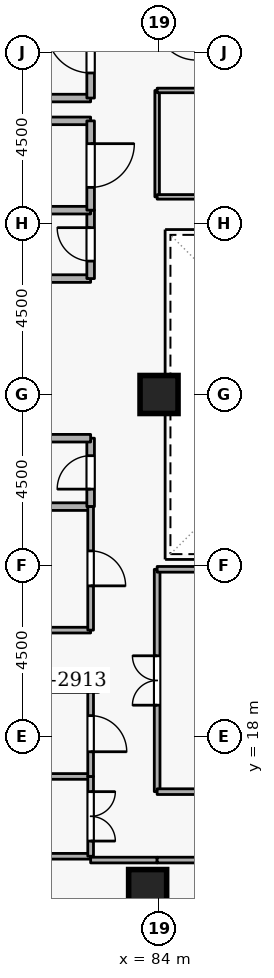
"""IFC4 building model, lengths in metres.
Left out: names, types, materials, properties, quantities, classifications, styles, units other than length and angle.
Written with IfcOpenShell. Run it as: python <this file> out.ifc"""

import sys

from ifc_helpers import new_model, si_unit, direction, frame, frame_2d, origin, origin_2d, place, context, subcontext, project, spatial, rectangle, extrude, element, fill, save


model = new_model("IFC4")
c1 = context("Model", 3, precision=1e-05, world=origin(), true_north=direction((0.0, 1.0)))
c2 = subcontext(c1, "Body", "Model", "MODEL_VIEW")
j1 = project(units=[si_unit("LENGTHUNIT", "METRE"), si_unit("PLANEANGLEUNIT", "RADIAN")], contexts=[c1])
p1 = place(None, origin())
s1 = spatial("IfcSite", under=j1, at=p1, CompositionType="ELEMENT")
p2 = place(p1, origin())
s2 = spatial("IfcBuilding", under=s1, at=p2, CompositionType="ELEMENT")
p3 = place(p2, frame((0.0, 0.0, 240.3)))
s3 = spatial("IfcBuildingStorey", under=s2, at=p3, CompositionType="ELEMENT", Elevation=240.3)
p4 = place(p3, frame((76.6, 19.45, 0.0), z_axis=(0.0, 0.0, 1.0), x_axis=(1.0, 0.0, 0.0)))
e1 = element("IfcWall", 1, at=p4, inside=s3, PredefinedType="SHEAR", context=c2, shape_type="SweptSolid", body=[
    extrude(rectangle(XDim=5.8, YDim=0.5, at=frame_2d((2.9, 0.0))), origin(), (0.0, 0.0, 1.0), 3.6),
])
for number, where, z_axis, x_axis in (
    (2, (83.7, 14.0, 0.0), (0.0, 0.0, 1.0), (1.0, 0.0, 0.0)),
    (3, (84.0, 27.0, 0.0), (0.0, 0.0, 1.0), (1.0, 0.0, 0.0)),
):
    element("IfcColumn", number, at=place(p3, frame(where, z_axis=z_axis, x_axis=x_axis)), inside=s3, PredefinedType="COLUMN", context=c2, shape_type="SweptSolid", body=[
        extrude(rectangle(XDim=1.0, YDim=1.0, at=origin_2d()), origin(), (0.0, 0.0, 1.0), 3.6),
    ])
p5 = place(p3, frame((79.9, 34.8, 0.0), z_axis=(0.0, 0.0, 1.0), x_axis=(1.0, 0.0, 0.0)))
e4 = element("IfcWall", 4, at=p5, inside=s3, PredefinedType="STANDARD", context=c2, shape_type="SweptSolid", body=[
    extrude(rectangle(XDim=2.3, YDim=0.2, at=frame_2d((1.15, 0.0))), origin(), (0.0, 0.0, 1.0), 2.545),
])
p6 = place(p3, frame((82.2, 34.8, 0.0), z_axis=(0.0, 0.0, 1.0), x_axis=(0.0, 1.0, 0.0)))
e5 = element("IfcWall", 5, at=p6, inside=s3, PredefinedType="STANDARD", context=c2, shape_type="SweptSolid", body=[
    extrude(rectangle(XDim=2.5, YDim=0.2, at=frame_2d((1.25, 0.0))), origin(), (0.0, 0.0, 1.0), 3.34),
])
p7 = place(p6, frame((0.66, 0.0, 0.0)))
e6 = element("IfcOpeningElement", 6, at=p7, cuts=e5, PredefinedType="OPENING", context=c2, shape_type="SweptSolid", body=[
    extrude(rectangle(XDim=1.15, YDim=2.1, at=frame_2d((0.575, 1.05))), frame((0.0, 0.11, 0.0), z_axis=(0.0, -1.0, 0.0), x_axis=(1.0, 0.0, 0.0)), (0.0, 0.0, 1.0), 0.22),
])
p8 = place(p3, frame((80.15, 24.05, 0.0), z_axis=(0.0, 0.0, 1.0), x_axis=(1.0, 0.0, 0.0)))
e7 = element("IfcWall", 7, at=p8, inside=s3, PredefinedType="STANDARD", context=c2, shape_type="SweptSolid", body=[
    extrude(rectangle(XDim=2.05, YDim=0.2, at=frame_2d((1.025, 0.0))), origin(), (0.0, 0.0, 1.0), 3.34),
])
p9 = place(p3, frame((82.2, 24.05, 0.0), z_axis=(0.0, 0.0, 1.0), x_axis=(0.0, 1.0, 0.0)))
e8 = element("IfcWall", 8, at=p9, inside=s3, PredefinedType="STANDARD", context=c2, shape_type="SweptSolid", body=[
    extrude(rectangle(XDim=1.8, YDim=0.2, at=frame_2d((0.9, 0.0))), origin(), (0.0, 0.0, 1.0), 3.34),
])
p10 = place(p9, frame((0.46, 0.0, 0.0)))
e9 = element("IfcOpeningElement", 9, at=p10, cuts=e8, PredefinedType="OPENING", context=c2, shape_type="SweptSolid", body=[
    extrude(rectangle(XDim=0.88, YDim=2.04, at=frame_2d((0.44, 1.02))), frame((0.0, 0.11, 0.0), z_axis=(0.0, -1.0, 0.0), x_axis=(1.0, 0.0, 0.0)), (0.0, 0.0, 1.0), 0.22),
])
for number, where, z_axis, x_axis in (
    (10, (82.2, 25.85, 0.0), (0.0, 0.0, 1.0), (-1.0, 0.0, 0.0)),
    (11, (80.15, 30.05, 0.0), (0.0, 0.0, 1.0), (1.0, 0.0, 0.0)),
):
    element("IfcWall", number, at=place(p3, frame(where, z_axis=z_axis, x_axis=x_axis)), inside=s3, PredefinedType="STANDARD", context=c2, shape_type="SweptSolid", body=[
        extrude(rectangle(XDim=2.05, YDim=0.2, at=frame_2d((1.025, 0.0))), origin(), (0.0, 0.0, 1.0), 3.34),
    ])
p11 = place(p3, frame((82.2, 30.05, 0.0), z_axis=(0.0, 0.0, 1.0), x_axis=(0.0, 1.0, 0.0)))
e12 = element("IfcWall", 12, at=p11, inside=s3, PredefinedType="STANDARD", context=c2, shape_type="SweptSolid", body=[
    extrude(rectangle(XDim=1.8, YDim=0.2, at=frame_2d((0.9, 0.0))), origin(), (0.0, 0.0, 1.0), 3.34),
])
p12 = place(p11, frame((0.46, 0.0, 0.0)))
e13 = element("IfcOpeningElement", 13, at=p12, cuts=e12, PredefinedType="OPENING", context=c2, shape_type="SweptSolid", body=[
    extrude(rectangle(XDim=0.88, YDim=2.04, at=frame_2d((0.44, 1.02))), frame((0.0, 0.11, 0.0), z_axis=(0.0, -1.0, 0.0), x_axis=(1.0, 0.0, 0.0)), (0.0, 0.0, 1.0), 0.22),
])
p13 = place(p3, frame((82.2, 31.85, 0.0), z_axis=(0.0, 0.0, 1.0), x_axis=(-1.0, 0.0, 0.0)))
e14 = element("IfcWall", 14, at=p13, inside=s3, PredefinedType="STANDARD", context=c2, shape_type="SweptSolid", body=[
    extrude(rectangle(XDim=2.05, YDim=0.2, at=frame_2d((1.025, 0.0))), origin(), (0.0, 0.0, 1.0), 3.34),
])
p14 = place(p3, frame((80.15, 34.2, 0.0), z_axis=(0.0, 0.0, 1.0), x_axis=(1.0, 0.0, 0.0)))
e15 = element("IfcWall", 15, at=p14, inside=s3, PredefinedType="STANDARD", context=c2, shape_type="SweptSolid", body=[
    extrude(rectangle(XDim=2.05, YDim=0.2, at=frame_2d((1.025, 0.0))), origin(), (0.0, 0.0, 1.0), 2.545),
])
p15 = place(p3, frame((82.2, 34.2, 0.0), z_axis=(0.0, 0.0, 1.0), x_axis=(0.0, -1.0, 0.0)))
e16 = element("IfcWall", 16, at=p15, inside=s3, PredefinedType="STANDARD", context=c2, shape_type="SweptSolid", body=[
    extrude(rectangle(XDim=2.35, YDim=0.2, at=frame_2d((1.175, 0.0))), origin(), (0.0, 0.0, 1.0), 3.34),
])
p16 = place(p15, frame((0.6, 0.0, 0.0)))
e17 = element("IfcOpeningElement", 17, at=p16, cuts=e16, PredefinedType="OPENING", context=c2, shape_type="SweptSolid", body=[
    extrude(rectangle(XDim=1.15, YDim=2.1, at=frame_2d((0.575, 1.05))), frame((0.0, 0.11, 0.0), z_axis=(0.0, -1.0, 0.0), x_axis=(1.0, 0.0, 0.0)), (0.0, 0.0, 1.0), 0.22),
])
p17 = place(p3, frame((82.2, 20.8, 0.0), z_axis=(0.0, 0.0, 1.0), x_axis=(-1.0, 0.0, 0.0)))
e18 = element("IfcWall", 18, at=p17, inside=s3, PredefinedType="PARTITIONING", context=c2, shape_type="SweptSolid", body=[
    extrude(rectangle(XDim=2.05, YDim=0.15, at=frame_2d((1.025, 0.0))), origin(), (0.0, 0.0, 1.0), 3.34),
])
p18 = place(p3, frame((82.2, 24.05, 0.0), z_axis=(0.0, 0.0, 1.0), x_axis=(0.0, -1.0, 0.0)))
e19 = element("IfcWall", 19, at=p18, inside=s3, PredefinedType="PARTITIONING", context=c2, shape_type="SweptSolid", body=[
    extrude(rectangle(XDim=3.25, YDim=0.15, at=frame_2d((1.625, 0.0))), origin(), (0.0, 0.0, 1.0), 3.34),
])
p19 = place(p18, frame((1.165, 0.0, 0.0)))
e20 = element("IfcOpeningElement", 20, at=p19, cuts=e19, PredefinedType="OPENING", context=c2, shape_type="SweptSolid", body=[
    extrude(rectangle(XDim=0.92, YDim=2.08, at=frame_2d((0.46, 1.04))), frame((0.0, 0.085, 0.0), z_axis=(0.0, -1.0, 0.0), x_axis=(1.0, 0.0, 0.0)), (0.0, 0.0, 1.0), 0.17),
])
for number, where, z_axis, x_axis in (
    (21, (82.2, 14.85, 0.0), (0.0, 0.0, 1.0), (-1.0, 0.0, 0.0)),
    (22, (70.78, 16.95, 0.0), (0.0, 0.0, 1.0), (1.0, 0.0, 0.0)),
):
    element("IfcWall", number, at=place(p3, frame(where, z_axis=z_axis, x_axis=x_axis)), inside=s3, PredefinedType="PARTITIONING", context=c2, shape_type="SweptSolid", body=[
        extrude(rectangle(XDim=11.42, YDim=0.15, at=frame_2d((5.71, 0.0))), origin(), (0.0, 0.0, 1.0), 3.34),
    ])
p20 = place(p3, frame((82.2, 16.95, 0.0), z_axis=(0.0, 0.0, 1.0), x_axis=(0.0, -1.0, 0.0)))
e23 = element("IfcWall", 23, at=p20, inside=s3, PredefinedType="PARTITIONING", context=c2, shape_type="SweptSolid", body=[
    extrude(rectangle(XDim=2.1, YDim=0.15, at=frame_2d((1.05, 0.0))), origin(), (0.0, 0.0, 1.0), 3.34),
])
p21 = place(p20, frame((0.4, 0.0, 0.0)))
e24 = element("IfcOpeningElement", 24, at=p21, cuts=e23, PredefinedType="OPENING", context=c2, shape_type="SweptSolid", body=[
    extrude(rectangle(XDim=1.3, YDim=2.12, at=frame_2d((0.65, 1.06))), frame((0.0, 0.085, 0.0), z_axis=(0.0, -1.0, 0.0), x_axis=(1.0, 0.0, 0.0)), (0.0, 0.0, 1.0), 0.17),
])
p22 = place(p3, frame((82.2, 19.2, 0.0), z_axis=(0.0, 0.0, 1.0), x_axis=(0.0, -1.0, 0.0)))
e25 = element("IfcWall", 25, at=p22, inside=s3, PredefinedType="PARTITIONING", context=c2, shape_type="SweptSolid", body=[
    extrude(rectangle(XDim=2.25, YDim=0.15, at=frame_2d((1.125, 0.0))), origin(), (0.0, 0.0, 1.0), 3.34),
])
p23 = place(p22, frame((0.65, 0.0, 0.0)))
e26 = element("IfcOpeningElement", 26, at=p23, cuts=e25, PredefinedType="OPENING", context=c2, shape_type="SweptSolid", body=[
    extrude(rectangle(XDim=0.95, YDim=2.1, at=frame_2d((0.475, 1.05))), frame((0.0, 0.085, 0.0), z_axis=(0.0, -1.0, 0.0), x_axis=(1.0, 0.0, 0.0)), (0.0, 0.0, 1.0), 0.17),
])
p24 = place(p3, frame((82.2, 14.75, 0.0), z_axis=(0.0, 0.0, 1.0), x_axis=(1.0, 0.0, 0.0)))
e27 = element("IfcWall", 27, at=p24, inside=s3, PredefinedType="PARTITIONING", context=c2, shape_type="SweptSolid", body=[
    extrude(rectangle(XDim=1.75, YDim=0.15, at=frame_2d((0.875, 0.0))), origin(), (0.0, 0.0, 1.0), 3.34),
])
p25 = place(p3, frame((83.95, 14.75, 0.0), z_axis=(0.0, 0.0, 1.0), x_axis=(1.0, 0.0, 0.0)))
e28 = element("IfcWall", 28, at=p25, inside=s3, PredefinedType="PARTITIONING", context=c2, shape_type="SweptSolid", body=[
    extrude(rectangle(XDim=3.35, YDim=0.15, at=frame_2d((1.675, 0.0))), origin(), (0.0, 0.0, 1.0), 3.34),
])
p26 = place(p25, frame((1.025, 0.0, 0.0)))
e29 = element("IfcOpeningElement", 29, at=p26, cuts=e28, PredefinedType="OPENING", context=c2, shape_type="SweptSolid", body=[
    extrude(rectangle(XDim=1.3, YDim=2.12, at=frame_2d((0.65, 1.06))), frame((0.0, 0.085, 0.0), z_axis=(0.0, -1.0, 0.0), x_axis=(1.0, 0.0, 0.0)), (0.0, 0.0, 1.0), 0.17),
])
p27 = place(p3, frame((83.95, 16.55, 0.0), z_axis=(0.0, 0.0, 1.0), x_axis=(0.0, 1.0, 0.0)))
e30 = element("IfcWall", 30, at=p27, inside=s3, PredefinedType="PARTITIONING", context=c2, shape_type="SweptSolid", body=[
    extrude(rectangle(XDim=5.85, YDim=0.15, at=frame_2d((2.925, 0.0))), origin(), (0.0, 0.0, 1.0), 3.34),
])
p28 = place(p27, frame((2.275, 0.0, 0.0)))
e31 = element("IfcOpeningElement", 31, at=p28, cuts=e30, PredefinedType="OPENING", context=c2, shape_type="SweptSolid", body=[
    extrude(rectangle(XDim=1.3, YDim=2.12, at=frame_2d((0.65, 1.06))), frame((0.0, 0.085, 0.0), z_axis=(0.0, -1.0, 0.0), x_axis=(1.0, 0.0, 0.0)), (0.0, 0.0, 1.0), 0.17),
])
for number, where, z_axis, x_axis in (
    (32, (83.95, 22.4, 0.0), (0.0, 0.0, 1.0), (1.0, 0.0, 0.0)),
    (33, (87.3, 16.55, 0.0), (0.0, 0.0, 1.0), (-1.0, 0.0, 0.0)),
):
    element("IfcWall", number, at=place(p3, frame(where, z_axis=z_axis, x_axis=x_axis)), inside=s3, PredefinedType="PARTITIONING", context=c2, shape_type="SweptSolid", body=[
        extrude(rectangle(XDim=3.35, YDim=0.15, at=frame_2d((1.675, 0.0))), origin(), (0.0, 0.0, 1.0), 3.34),
    ])
p29 = place(p3, frame((83.95, 32.2, 0.0), z_axis=(0.0, 0.0, 1.0), x_axis=(0.0, 1.0, 0.0)))
e34 = element("IfcWall", 34, at=p29, inside=s3, PredefinedType="PARTITIONING", context=c2, shape_type="SweptSolid", body=[
    extrude(rectangle(XDim=2.8, YDim=0.12, at=frame_2d((1.4, 0.0))), origin(), (0.0, 0.0, 1.0), 3.34),
])
p30 = place(p3, frame((83.95, 35.0, 0.0), z_axis=(0.0, 0.0, 1.0), x_axis=(1.0, 0.0, 0.0)))
e35 = element("IfcWall", 35, at=p30, inside=s3, PredefinedType="PARTITIONING", context=c2, shape_type="SweptSolid", body=[
    extrude(rectangle(XDim=4.55, YDim=0.12, at=frame_2d((2.275, 0.0))), origin(), (0.0, 0.0, 1.0), 3.34),
])
p31 = place(p30, frame((1.8, 0.0, 0.0)))
e36 = element("IfcOpeningElement", 36, at=p31, cuts=e35, PredefinedType="OPENING", context=c2, shape_type="SweptSolid", body=[
    extrude(rectangle(XDim=0.95, YDim=2.1, at=frame_2d((0.475, 1.05))), frame((0.0, 0.07, 0.0), z_axis=(0.0, -1.0, 0.0), x_axis=(1.0, 0.0, 0.0)), (0.0, 0.0, 1.0), 0.14),
])
p32 = place(p3, frame((88.5, 32.2, 0.0), z_axis=(0.0, 0.0, 1.0), x_axis=(-1.0, 0.0, 0.0)))
e37 = element("IfcWall", 37, at=p32, inside=s3, PredefinedType="PARTITIONING", context=c2, shape_type="SweptSolid", body=[
    extrude(rectangle(XDim=4.55, YDim=0.12, at=frame_2d((2.275, 0.0))), origin(), (0.0, 0.0, 1.0), 3.34),
])
p33 = place(p7, origin())
e38 = element("IfcDoor", 38, at=p33, inside=s3, OperationType="SINGLE_SWING_RIGHT", PredefinedType="DOOR", context=c2, shape_type="SweptSolid", body=[
    extrude(rectangle(XDim=1.15, YDim=2.1, at=frame_2d((0.575, 1.05))), frame((0.0, 0.025, 0.0), z_axis=(0.0, -1.0, 0.0), x_axis=(1.0, 0.0, 0.0)), (0.0, 0.0, 1.0), 0.05),
])
fill(e6, e38)
p34 = place(p10, origin())
e39 = element("IfcDoor", 39, at=p34, inside=s3, OperationType="SINGLE_SWING_LEFT", PredefinedType="DOOR", context=c2, shape_type="SweptSolid", body=[
    extrude(rectangle(XDim=0.88, YDim=2.04, at=frame_2d((0.44, 1.02))), frame((0.0, 0.025, 0.0), z_axis=(0.0, -1.0, 0.0), x_axis=(1.0, 0.0, 0.0)), (0.0, 0.0, 1.0), 0.05),
])
fill(e9, e39)
p35 = place(p12, origin())
e40 = element("IfcDoor", 40, at=p35, inside=s3, OperationType="SINGLE_SWING_RIGHT", PredefinedType="DOOR", context=c2, shape_type="SweptSolid", body=[
    extrude(rectangle(XDim=0.88, YDim=2.04, at=frame_2d((0.44, 1.02))), frame((0.0, 0.025, 0.0), z_axis=(0.0, -1.0, 0.0), x_axis=(1.0, 0.0, 0.0)), (0.0, 0.0, 1.0), 0.05),
])
fill(e13, e40)
p36 = place(p19, origin())
e41 = element("IfcDoor", 41, at=p36, inside=s3, OperationType="SINGLE_SWING_RIGHT", PredefinedType="DOOR", context=c2, shape_type="SweptSolid", body=[
    extrude(rectangle(XDim=0.92, YDim=2.08, at=frame_2d((0.46, 1.04))), frame((0.0, 0.025, 0.0), z_axis=(0.0, -1.0, 0.0), x_axis=(1.0, 0.0, 0.0)), (0.0, 0.0, 1.0), 0.05),
])
fill(e20, e41)
p37 = place(p16, origin())
e42 = element("IfcDoor", 42, at=p37, inside=s3, OperationType="SINGLE_SWING_LEFT", PredefinedType="DOOR", context=c2, shape_type="SweptSolid", body=[
    extrude(rectangle(XDim=1.15, YDim=2.1, at=frame_2d((0.575, 1.05))), frame((0.0, 0.025, 0.0), z_axis=(0.0, -1.0, 0.0), x_axis=(1.0, 0.0, 0.0)), (0.0, 0.0, 1.0), 0.05),
])
fill(e17, e42)
p38 = place(p21, origin())
e43 = element("IfcDoor", 43, at=p38, inside=s3, OperationType="DOUBLE_DOOR_SINGLE_SWING", PredefinedType="DOOR", context=c2, shape_type="SweptSolid", body=[
    extrude(rectangle(XDim=1.3, YDim=2.12, at=frame_2d((0.65, 1.06))), frame((0.0, 0.025, 0.0), z_axis=(0.0, -1.0, 0.0), x_axis=(1.0, 0.0, 0.0)), (0.0, 0.0, 1.0), 0.05),
])
fill(e24, e43)
p39 = place(p23, origin())
e44 = element("IfcDoor", 44, at=p39, inside=s3, OperationType="SINGLE_SWING_RIGHT", PredefinedType="DOOR", context=c2, shape_type="SweptSolid", body=[
    extrude(rectangle(XDim=0.95, YDim=2.1, at=frame_2d((0.475, 1.05))), frame((0.0, 0.025, 0.0), z_axis=(0.0, -1.0, 0.0), x_axis=(1.0, 0.0, 0.0)), (0.0, 0.0, 1.0), 0.05),
])
fill(e26, e44)
p40 = place(p28, origin())
e45 = element("IfcDoor", 45, at=p40, inside=s3, OperationType="DOUBLE_DOOR_SINGLE_SWING", PredefinedType="DOOR", context=c2, shape_type="SweptSolid", body=[
    extrude(rectangle(XDim=1.3, YDim=2.12, at=frame_2d((0.65, 1.06))), frame((0.0, 0.025, 0.0), z_axis=(0.0, -1.0, 0.0), x_axis=(1.0, 0.0, 0.0)), (0.0, 0.0, 1.0), 0.05),
])
fill(e31, e45)
save(model, sys.argv[1])
